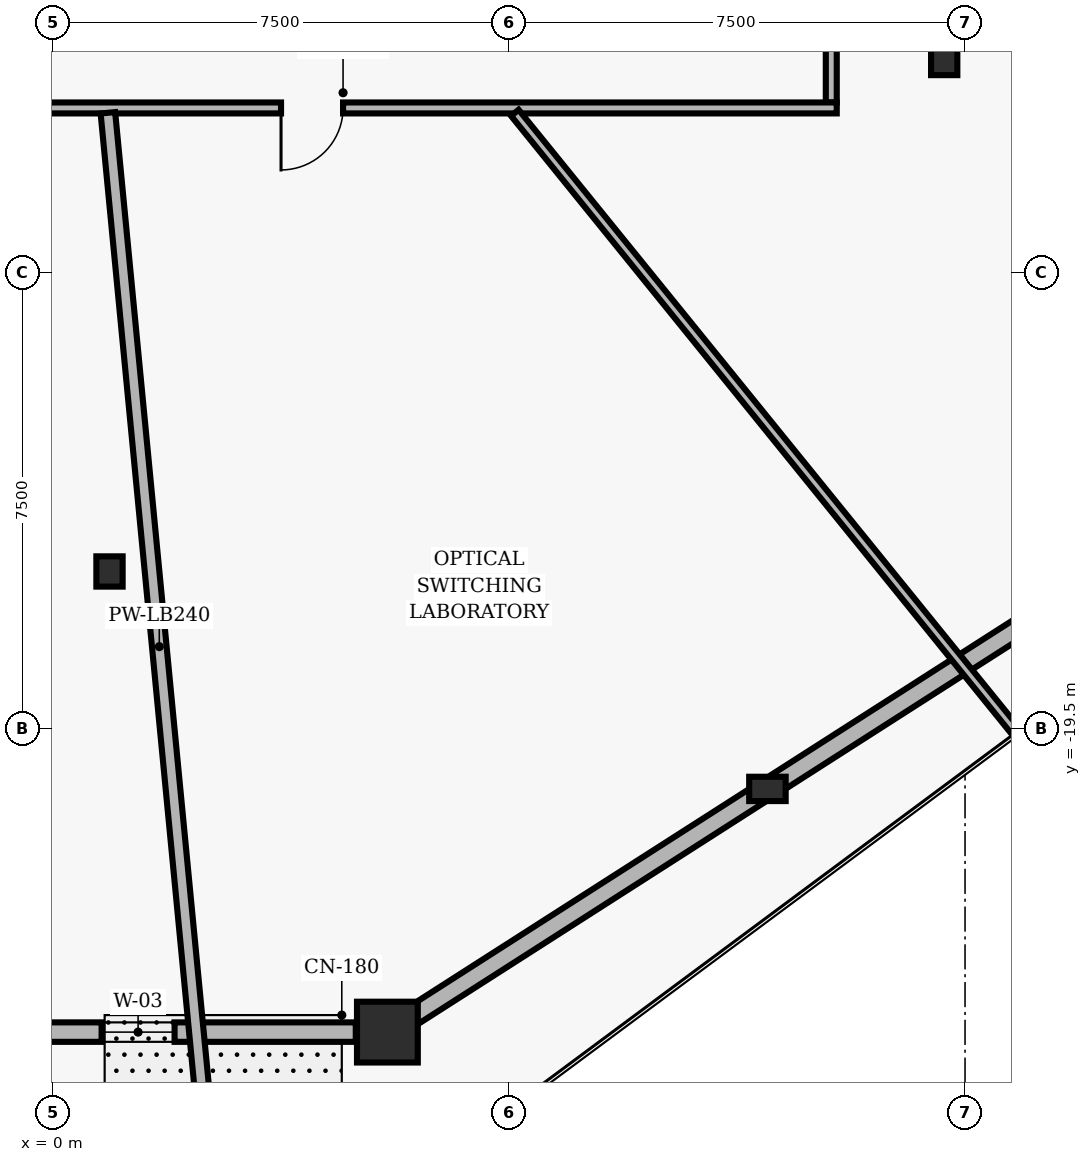
"""IFC4 building model, lengths in metres.
Left out: names, types, materials, properties, quantities, classifications, styles, units other than length and angle.
Written with IfcOpenShell. Run it as: python <this file> out.ifc"""

import sys

from ifc_helpers import new_model, si_unit, direction, frame, frame_2d, origin, origin_2d, place, context, subcontext, project, spatial, rectangle, i_section, extrude, element, fill, save


model = new_model("IFC4")
c1 = context("Model", 3, precision=1e-05, world=origin(), true_north=direction((0.0, 1.0)))
c2 = subcontext(c1, "Body", "Model", "MODEL_VIEW")
j1 = project(units=[si_unit("LENGTHUNIT", "METRE"), si_unit("PLANEANGLEUNIT", "RADIAN")], contexts=[c1])
p1 = place(None, origin())
s1 = spatial("IfcSite", under=j1, at=p1, CompositionType="ELEMENT")
p2 = place(p1, origin())
s2 = spatial("IfcBuilding", under=s1, at=p2, CompositionType="ELEMENT")
p3 = place(p2, frame((0.0, 0.0, 4.8)))
s3 = spatial("IfcBuildingStorey", under=s2, at=p3, CompositionType="ELEMENT", Elevation=4.8)
p4 = place(p3, frame((5.5, -24.5, 0.0), z_axis=(0.0, 0.0, 1.0), x_axis=(1.0, 0.0, 0.0)))
e1 = element("IfcColumn", 1, at=p4, inside=s3, PredefinedType="COLUMN", context=c2, shape_type="SweptSolid", body=[
    extrude(rectangle(XDim=1.0, YDim=1.0, at=origin_2d()), origin(), (0.0, 0.0, 1.0), 3.52),
])
for number, where, z_axis, x_axis in (
    (2, (0.93, -16.924, 0.0), (0.0, 0.0, 1.0), (1.0, 0.0, 0.0)),
    (3, (14.657, -8.512, 0.0), (0.0, 0.0, 1.0), (1.0, 0.0, 0.0)),
):
    element("IfcColumn", number, at=place(p3, frame(where, z_axis=z_axis, x_axis=x_axis)), inside=s3, PredefinedType="COLUMN", context=c2, shape_type="SweptSolid", body=[
        extrude(i_section(OverallWidth=0.432, OverallDepth=0.498, WebThickness=0.056, FlangeThickness=0.089, FilletRadius=0.025, at=origin_2d()), origin(), (0.0, 0.0, 1.0), 3.52),
    ])
p5 = place(p3, frame((11.75, -20.5, 0.0), z_axis=(0.0, 0.0, 1.0), x_axis=(1.0, 0.0, 0.0)))
e4 = element("IfcColumn", 4, at=p5, inside=s3, PredefinedType="PILASTER", context=c2, shape_type="SweptSolid", body=[
    extrude(rectangle(XDim=0.6, YDim=0.4, at=origin_2d()), origin(), (0.0, 0.0, 1.0), 3.52),
])
p6 = place(p3, frame((4.98, -24.5, 0.0), z_axis=(0.0, 0.0, 1.0), x_axis=(-1.0, 0.0, 0.0)))
e5 = element("IfcWall", 5, at=p6, inside=s3, PredefinedType="SOLIDWALL", context=c2, shape_type="SweptSolid", body=[
    extrude(rectangle(XDim=11.96, YDim=0.32, at=frame_2d((5.98, 0.0))), origin(), (0.0, 0.0, 1.0), 2.588),
])
p7 = place(p6, frame((2.98, 0.0, 0.65)))
e6 = element("IfcOpeningElement", 6, at=p7, cuts=e5, PredefinedType="OPENING", context=c2, shape_type="SweptSolid", body=[
    extrude(rectangle(XDim=1.2, YDim=1.6, at=frame_2d((0.6, 0.8))), frame((0.0, 0.17, 0.0), z_axis=(0.0, -1.0, 0.0), x_axis=(1.0, 0.0, 0.0)), (0.0, 0.0, 1.0), 0.34),
])
p8 = place(p6, frame((5.38, 0.0, 0.65)))
e7 = element("IfcOpeningElement", 7, at=p8, cuts=e5, PredefinedType="OPENING", context=c2, shape_type="SweptSolid", body=[
    extrude(rectangle(XDim=1.2, YDim=1.6, at=frame_2d((0.6, 0.8))), frame((0.0, 0.17, 0.0), z_axis=(0.0, -1.0, 0.0), x_axis=(1.0, 0.0, 0.0)), (0.0, 0.0, 1.0), 0.34),
])
p9 = place(p6, frame((7.78, 0.0, 0.65)))
e8 = element("IfcOpeningElement", 8, at=p9, cuts=e5, PredefinedType="OPENING", context=c2, shape_type="SweptSolid", body=[
    extrude(rectangle(XDim=1.2, YDim=1.6, at=frame_2d((0.6, 0.8))), frame((0.0, 0.17, 0.0), z_axis=(0.0, -1.0, 0.0), x_axis=(1.0, 0.0, 0.0)), (0.0, 0.0, 1.0), 0.34),
])
p10 = place(p3, frame((17.562, -16.78, 0.0), z_axis=(0.0, 0.0, 1.0), x_axis=(-0.842268830443, -0.539057712368, 0.0)))
e9 = element("IfcWall", 9, at=p10, inside=s3, PredefinedType="SOLIDWALL", context=c2, shape_type="SweptSolid", body=[
    extrude(rectangle(XDim=13.801, YDim=0.32, at=frame_2d((6.9, 0.0))), origin(), (0.0, 0.0, 1.0), 2.588),
])
p11 = place(p3, frame((12.8, -1.59, 0.0), z_axis=(0.0, 0.0, 1.0), x_axis=(0.0, -1.0, 0.0)))
e10 = element("IfcWall", 10, at=p11, inside=s3, PredefinedType="PARTITIONING", context=c2, shape_type="SweptSolid", body=[
    extrude(rectangle(XDim=7.62, YDim=0.18, at=frame_2d((3.81, 0.0))), origin(), (0.0, 0.0, 1.0), 3.193),
])
p12 = place(p11, frame((4.204, 0.0, 0.0)))
e11 = element("IfcOpeningElement", 11, at=p12, cuts=e10, PredefinedType="OPENING", context=c2, shape_type="SweptSolid", body=[
    extrude(rectangle(XDim=1.18, YDim=2.02, at=frame_2d((0.59, 1.01))), frame((0.0, 0.1, 0.0), z_axis=(0.0, -1.0, 0.0), x_axis=(1.0, 0.0, 0.0)), (0.0, 0.0, 1.0), 0.2),
])
p13 = place(p3, frame((12.89, -9.3, 0.0), z_axis=(0.0, 0.0, 1.0), x_axis=(-1.0, 0.0, 0.0)))
e12 = element("IfcWall", 12, at=p13, inside=s3, PredefinedType="PARTITIONING", context=c2, shape_type="SweptSolid", body=[
    extrude(rectangle(XDim=25.78, YDim=0.18, at=frame_2d((12.89, 0.0))), origin(), (0.0, 0.0, 1.0), 2.76),
])
p14 = place(p13, frame((21.167, 0.0, 0.0)))
e13 = element("IfcOpeningElement", 13, at=p14, cuts=e12, PredefinedType="OPENING", context=c2, shape_type="SweptSolid", body=[
    extrude(rectangle(XDim=1.18, YDim=2.02, at=frame_2d((0.59, 1.01))), frame((0.0, 0.1, 0.0), z_axis=(0.0, -1.0, 0.0), x_axis=(1.0, 0.0, 0.0)), (0.0, 0.0, 1.0), 0.2),
])
p15 = place(p13, frame((14.507, 0.0, 0.0)))
e14 = element("IfcOpeningElement", 14, at=p15, cuts=e12, PredefinedType="OPENING", context=c2, shape_type="SweptSolid", body=[
    extrude(rectangle(XDim=0.96, YDim=2.02, at=frame_2d((0.48, 1.01))), frame((0.0, 0.1, 0.0), z_axis=(0.0, -1.0, 0.0), x_axis=(1.0, 0.0, 0.0)), (0.0, 0.0, 1.0), 0.2),
])
p16 = place(p13, frame((8.119, 0.0, 0.0)))
e15 = element("IfcOpeningElement", 15, at=p16, cuts=e12, PredefinedType="OPENING", context=c2, shape_type="SweptSolid", body=[
    extrude(rectangle(XDim=1.02, YDim=2.02, at=frame_2d((0.51, 1.01))), frame((0.0, 0.1, 0.0), z_axis=(0.0, -1.0, 0.0), x_axis=(1.0, 0.0, 0.0)), (0.0, 0.0, 1.0), 0.2),
])
p17 = place(p3, frame((0.903, -9.38, 0.0), z_axis=(0.0, 0.0, 1.0), x_axis=(0.095836344943, -0.995397104169, 0.0)))
e16 = element("IfcWall", 16, at=p17, inside=s3, PredefinedType="PARTITIONING", context=c2, shape_type="SweptSolid", body=[
    extrude(rectangle(XDim=17.641, YDim=0.24, at=frame_2d((8.821, 0.0))), origin(), (0.0, 0.0, 1.0), 3.193),
])
p18 = place(p3, frame((7.596, -9.38, 0.0), z_axis=(0.0, 0.0, 1.0), x_axis=(0.62932258483, -0.777144184964, 0.0)))
e17 = element("IfcWall", 17, at=p18, inside=s3, PredefinedType="PARTITIONING", context=c2, shape_type="SweptSolid", body=[
    extrude(rectangle(XDim=13.158, YDim=0.16, at=frame_2d((6.579, 0.0))), origin(), (0.0, 0.0, 1.0), 3.193),
])
p19 = place(p3, frame((12.88, -3.815, 0.0), z_axis=(0.0, 0.0, 1.0), x_axis=(0.958821118113, -0.284010674906, 0.0)))
e18 = element("IfcWall", 18, at=p19, inside=s3, PredefinedType="MOVABLE", context=c2, shape_type="SweptSolid", body=[
    extrude(rectangle(XDim=18.091, YDim=0.115, at=frame_2d((9.045, 0.0))), origin(), (0.0, 0.0, 1.0), 2.246),
])
p20 = place(p7, origin())
e19 = element("IfcWindow", 19, at=p20, inside=s3, PartitioningType="SINGLE_PANEL", PredefinedType="WINDOW", context=c2, shape_type="SweptSolid", body=[
    extrude(rectangle(XDim=1.2, YDim=1.6, at=frame_2d((0.6, 0.8))), frame((0.0, 0.03, 0.0), z_axis=(0.0, -1.0, 0.0), x_axis=(1.0, 0.0, 0.0)), (0.0, 0.0, 1.0), 0.06),
])
fill(e6, e19)
p21 = place(p16, origin())
e20 = element("IfcDoor", 20, at=p21, inside=s3, OperationType="SINGLE_SWING_RIGHT", PredefinedType="DOOR", context=c2, shape_type="SweptSolid", body=[
    extrude(rectangle(XDim=1.02, YDim=2.02, at=frame_2d((0.51, 1.01))), frame((0.0, 0.025, 0.0), z_axis=(0.0, -1.0, 0.0), x_axis=(1.0, 0.0, 0.0)), (0.0, 0.0, 1.0), 0.05),
])
fill(e15, e20)
save(model, sys.argv[1])
